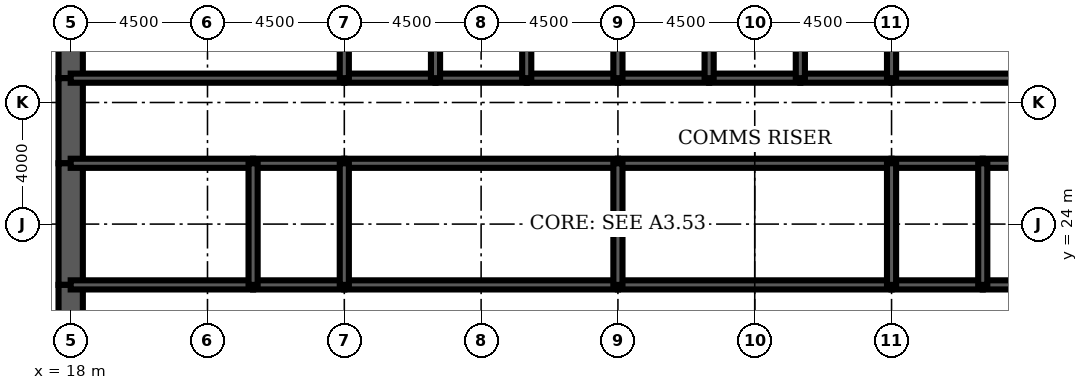
"""IFC4 building model, lengths in metres.
Left out: names, types, materials, properties, quantities, classifications, styles, units other than length and angle.
Written with IfcOpenShell. Run it as: python <this file> out.ifc"""

import sys

from ifc_helpers import new_model, si_unit, direction, frame, frame_2d, origin, place, context, subcontext, project, spatial, rectangle, extrude, element, fill, save


model = new_model("IFC4")
c1 = context("Model", 3, precision=1e-05, world=origin(), true_north=direction((0.0, 1.0)))
c2 = subcontext(c1, "Body", "Model", "MODEL_VIEW")
j1 = project(units=[si_unit("LENGTHUNIT", "METRE"), si_unit("PLANEANGLEUNIT", "RADIAN")], contexts=[c1])
p1 = place(None, origin())
s1 = spatial("IfcSite", under=j1, at=p1, CompositionType="ELEMENT")
p2 = place(p1, origin())
s2 = spatial("IfcBuilding", under=s1, at=p2, CompositionType="ELEMENT")
p3 = place(p2, frame((0.0, 0.0, 227.8)))
s3 = spatial("IfcBuildingStorey", under=s2, at=p3, CompositionType="ELEMENT", Elevation=227.8)
p4 = place(p3, frame((18.0, 32.0, 0.0), z_axis=(0.0, 0.0, 1.0), x_axis=(0.0, -1.0, 0.0)))
e1 = element("IfcWall", 1, at=p4, inside=s3, PredefinedType="SHEAR", context=c2, shape_type="SweptSolid", body=[
    extrude(rectangle(XDim=3.2, YDim=0.8, at=frame_2d((1.6, 0.0))), origin(), (0.0, 0.0, 1.0), 4.2),
])
p5 = place(p3, frame((18.0, 28.8, 0.0), z_axis=(0.0, 0.0, 1.0), x_axis=(0.0, -1.0, 0.0)))
e2 = element("IfcWall", 2, at=p5, inside=s3, PredefinedType="SHEAR", context=c2, shape_type="SweptSolid", body=[
    extrude(rectangle(XDim=2.8, YDim=0.8, at=frame_2d((1.4, 0.0))), origin(), (0.0, 0.0, 1.0), 4.2),
])
p6 = place(p5, frame((0.4, 0.0, 0.0)))
e3 = element("IfcOpeningElement", 3, at=p6, cuts=e2, PredefinedType="OPENING", context=c2, shape_type="SweptSolid", body=[
    extrude(rectangle(XDim=1.8, YDim=2.1, at=frame_2d((0.9, 1.05))), frame((0.0, 0.41, 0.0), z_axis=(0.0, -1.0, 0.0), x_axis=(1.0, 0.0, 0.0)), (0.0, 0.0, 1.0), 0.82),
])
p7 = place(p3, frame((18.0, 26.0, 0.0), z_axis=(0.0, 0.0, 1.0), x_axis=(0.0, -1.0, 0.0)))
e4 = element("IfcWall", 4, at=p7, inside=s3, PredefinedType="SHEAR", context=c2, shape_type="SweptSolid", body=[
    extrude(rectangle(XDim=4.0, YDim=0.8, at=frame_2d((2.0, 0.0))), origin(), (0.0, 0.0, 1.0), 4.2),
])
p8 = place(p3, frame((18.0, 22.0, 0.0), z_axis=(0.0, 0.0, 1.0), x_axis=(0.0, -1.0, 0.0)))
e5 = element("IfcWall", 5, at=p8, inside=s3, PredefinedType="SHEAR", context=c2, shape_type="SweptSolid", body=[
    extrude(rectangle(XDim=2.8, YDim=0.8, at=frame_2d((1.4, 0.0))), origin(), (0.0, 0.0, 1.0), 4.2),
])
p9 = place(p8, frame((0.6, 0.0, 0.0)))
e6 = element("IfcOpeningElement", 6, at=p9, cuts=e5, PredefinedType="OPENING", context=c2, shape_type="SweptSolid", body=[
    extrude(rectangle(XDim=1.8, YDim=2.1, at=frame_2d((0.9, 1.05))), frame((0.0, 0.41, 0.0), z_axis=(0.0, -1.0, 0.0), x_axis=(1.0, 0.0, 0.0)), (0.0, 0.0, 1.0), 0.82),
])
p10 = place(p3, frame((18.0, 28.8, 0.0), z_axis=(0.0, 0.0, 1.0), x_axis=(1.0, 0.0, 0.0)))
e7 = element("IfcWall", 7, at=p10, inside=s3, PredefinedType="SOLIDWALL", context=c2, shape_type="SweptSolid", body=[
    extrude(rectangle(XDim=9.0, YDim=0.3, at=frame_2d((4.5, 0.0))), origin(), (0.0, 0.0, 1.0), 4.2),
])
p11 = place(p10, frame((0.65, 0.0, 0.0)))
e8 = element("IfcOpeningElement", 8, at=p11, cuts=e7, PredefinedType="OPENING", context=c2, shape_type="SweptSolid", body=[
    extrude(rectangle(XDim=1.0, YDim=2.1, at=frame_2d((0.5, 1.05))), frame((0.0, 0.16, 0.0), z_axis=(0.0, -1.0, 0.0), x_axis=(1.0, 0.0, 0.0)), (0.0, 0.0, 1.0), 0.32),
])
p12 = place(p3, frame((27.0, 28.8, 0.0), z_axis=(0.0, 0.0, 1.0), x_axis=(1.0, 0.0, 0.0)))
e9 = element("IfcWall", 9, at=p12, inside=s3, PredefinedType="SOLIDWALL", context=c2, shape_type="SweptSolid", body=[
    extrude(rectangle(XDim=3.0, YDim=0.3, at=frame_2d((1.5, 0.0))), origin(), (0.0, 0.0, 1.0), 4.2),
])
p13 = place(p12, frame((0.95, 0.0, 0.0)))
e10 = element("IfcOpeningElement", 10, at=p13, cuts=e9, PredefinedType="OPENING", context=c2, shape_type="SweptSolid", body=[
    extrude(rectangle(XDim=1.1, YDim=2.2, at=frame_2d((0.55, 1.1))), frame((0.0, 0.16, 0.0), z_axis=(0.0, -1.0, 0.0), x_axis=(1.0, 0.0, 0.0)), (0.0, 0.0, 1.0), 0.32),
])
p14 = place(p3, frame((30.0, 28.8, 0.0), z_axis=(0.0, 0.0, 1.0), x_axis=(1.0, 0.0, 0.0)))
e11 = element("IfcWall", 11, at=p14, inside=s3, PredefinedType="SOLIDWALL", context=c2, shape_type="SweptSolid", body=[
    extrude(rectangle(XDim=3.0, YDim=0.3, at=frame_2d((1.5, 0.0))), origin(), (0.0, 0.0, 1.0), 4.2),
])
p15 = place(p14, frame((0.95, 0.0, 0.0)))
e12 = element("IfcOpeningElement", 12, at=p15, cuts=e11, PredefinedType="OPENING", context=c2, shape_type="SweptSolid", body=[
    extrude(rectangle(XDim=1.1, YDim=2.2, at=frame_2d((0.55, 1.1))), frame((0.0, 0.16, 0.0), z_axis=(0.0, -1.0, 0.0), x_axis=(1.0, 0.0, 0.0)), (0.0, 0.0, 1.0), 0.32),
])
p16 = place(p3, frame((33.0, 28.8, 0.0), z_axis=(0.0, 0.0, 1.0), x_axis=(1.0, 0.0, 0.0)))
e13 = element("IfcWall", 13, at=p16, inside=s3, PredefinedType="SOLIDWALL", context=c2, shape_type="SweptSolid", body=[
    extrude(rectangle(XDim=3.0, YDim=0.3, at=frame_2d((1.5, 0.0))), origin(), (0.0, 0.0, 1.0), 4.2),
])
p17 = place(p16, frame((0.95, 0.0, 0.0)))
e14 = element("IfcOpeningElement", 14, at=p17, cuts=e13, PredefinedType="OPENING", context=c2, shape_type="SweptSolid", body=[
    extrude(rectangle(XDim=1.1, YDim=2.2, at=frame_2d((0.55, 1.1))), frame((0.0, 0.16, 0.0), z_axis=(0.0, -1.0, 0.0), x_axis=(1.0, 0.0, 0.0)), (0.0, 0.0, 1.0), 0.32),
])
for number, where, z_axis, x_axis in (
    (15, (36.0, 28.8, 0.0), (0.0, 0.0, 1.0), (1.0, 0.0, 0.0)),
    (16, (39.0, 28.8, 0.0), (0.0, 0.0, 1.0), (1.0, 0.0, 0.0)),
):
    element("IfcWall", number, at=place(p3, frame(where, z_axis=z_axis, x_axis=x_axis)), inside=s3, PredefinedType="SOLIDWALL", context=c2, shape_type="SweptSolid", body=[
        extrude(rectangle(XDim=3.0, YDim=0.3, at=frame_2d((1.5, 0.0))), origin(), (0.0, 0.0, 1.0), 4.2),
    ])
p18 = place(p3, frame((42.0, 28.8, 0.0), z_axis=(0.0, 0.0, 1.0), x_axis=(1.0, 0.0, 0.0)))
e17 = element("IfcWall", 17, at=p18, inside=s3, PredefinedType="SOLIDWALL", context=c2, shape_type="SweptSolid", body=[
    extrude(rectangle(XDim=3.0, YDim=0.3, at=frame_2d((1.5, 0.0))), origin(), (0.0, 0.0, 1.0), 4.2),
])
p19 = place(p18, frame((0.95, 0.0, 0.0)))
e18 = element("IfcOpeningElement", 18, at=p19, cuts=e17, PredefinedType="OPENING", context=c2, shape_type="SweptSolid", body=[
    extrude(rectangle(XDim=1.1, YDim=2.2, at=frame_2d((0.55, 1.1))), frame((0.0, 0.16, 0.0), z_axis=(0.0, -1.0, 0.0), x_axis=(1.0, 0.0, 0.0)), (0.0, 0.0, 1.0), 0.32),
])
p20 = place(p3, frame((45.0, 28.8, 0.0), z_axis=(0.0, 0.0, 1.0), x_axis=(1.0, 0.0, 0.0)))
e19 = element("IfcWall", 19, at=p20, inside=s3, PredefinedType="SOLIDWALL", context=c2, shape_type="SweptSolid", body=[
    extrude(rectangle(XDim=9.0, YDim=0.3, at=frame_2d((4.5, 0.0))), origin(), (0.0, 0.0, 1.0), 4.2),
])
p21 = place(p20, frame((7.35, 0.0, 0.0)))
e20 = element("IfcOpeningElement", 20, at=p21, cuts=e19, PredefinedType="OPENING", context=c2, shape_type="SweptSolid", body=[
    extrude(rectangle(XDim=1.0, YDim=2.1, at=frame_2d((0.5, 1.05))), frame((0.0, 0.16, 0.0), z_axis=(0.0, -1.0, 0.0), x_axis=(1.0, 0.0, 0.0)), (0.0, 0.0, 1.0), 0.32),
])
p22 = place(p3, frame((18.0, 22.0, 0.0), z_axis=(0.0, 0.0, 1.0), x_axis=(1.0, 0.0, 0.0)))
e21 = element("IfcWall", 21, at=p22, inside=s3, PredefinedType="SOLIDWALL", context=c2, shape_type="SweptSolid", body=[
    extrude(rectangle(XDim=6.0, YDim=0.3, at=frame_2d((3.0, 0.0))), origin(), (0.0, 0.0, 1.0), 4.2),
])
p23 = place(p22, frame((4.4, 0.0, 0.0)))
e22 = element("IfcOpeningElement", 22, at=p23, cuts=e21, PredefinedType="OPENING", context=c2, shape_type="SweptSolid", body=[
    extrude(rectangle(XDim=1.0, YDim=2.1, at=frame_2d((0.5, 1.05))), frame((0.0, 0.16, 0.0), z_axis=(0.0, -1.0, 0.0), x_axis=(1.0, 0.0, 0.0)), (0.0, 0.0, 1.0), 0.32),
])
p24 = place(p22, frame((0.65, 0.0, 0.0)))
e23 = element("IfcOpeningElement", 23, at=p24, cuts=e21, PredefinedType="OPENING", context=c2, shape_type="SweptSolid", body=[
    extrude(rectangle(XDim=1.0, YDim=2.1, at=frame_2d((0.5, 1.05))), frame((0.0, 0.16, 0.0), z_axis=(0.0, -1.0, 0.0), x_axis=(1.0, 0.0, 0.0)), (0.0, 0.0, 1.0), 0.32),
])
p25 = place(p3, frame((24.0, 22.0, 0.0), z_axis=(0.0, 0.0, 1.0), x_axis=(1.0, 0.0, 0.0)))
e24 = element("IfcWall", 24, at=p25, inside=s3, PredefinedType="SOLIDWALL", context=c2, shape_type="SweptSolid", body=[
    extrude(rectangle(XDim=3.0, YDim=0.3, at=frame_2d((1.5, 0.0))), origin(), (0.0, 0.0, 1.0), 4.2),
])
p26 = place(p25, frame((1.0, 0.0, 0.0)))
e25 = element("IfcOpeningElement", 25, at=p26, cuts=e24, PredefinedType="OPENING", context=c2, shape_type="SweptSolid", body=[
    extrude(rectangle(XDim=1.0, YDim=2.1, at=frame_2d((0.5, 1.05))), frame((0.0, 0.16, 0.0), z_axis=(0.0, -1.0, 0.0), x_axis=(1.0, 0.0, 0.0)), (0.0, 0.0, 1.0), 0.32),
])
p27 = place(p3, frame((27.0, 22.0, 0.0), z_axis=(0.0, 0.0, 1.0), x_axis=(1.0, 0.0, 0.0)))
e26 = element("IfcWall", 26, at=p27, inside=s3, PredefinedType="SOLIDWALL", context=c2, shape_type="SweptSolid", body=[
    extrude(rectangle(XDim=9.0, YDim=0.3, at=frame_2d((4.5, 0.0))), origin(), (0.0, 0.0, 1.0), 4.2),
])
p28 = place(p27, frame((4.0, 0.0, 0.0)))
e27 = element("IfcOpeningElement", 27, at=p28, cuts=e26, PredefinedType="OPENING", context=c2, shape_type="SweptSolid", body=[
    extrude(rectangle(XDim=1.0, YDim=2.1, at=frame_2d((0.5, 1.05))), frame((0.0, 0.16, 0.0), z_axis=(0.0, -1.0, 0.0), x_axis=(1.0, 0.0, 0.0)), (0.0, 0.0, 1.0), 0.32),
])
p29 = place(p3, frame((36.0, 22.0, 0.0), z_axis=(0.0, 0.0, 1.0), x_axis=(1.0, 0.0, 0.0)))
e28 = element("IfcWall", 28, at=p29, inside=s3, PredefinedType="SOLIDWALL", context=c2, shape_type="SweptSolid", body=[
    extrude(rectangle(XDim=9.0, YDim=0.3, at=frame_2d((4.5, 0.0))), origin(), (0.0, 0.0, 1.0), 4.2),
])
p30 = place(p29, frame((4.0, 0.0, 0.0)))
e29 = element("IfcOpeningElement", 29, at=p30, cuts=e28, PredefinedType="OPENING", context=c2, shape_type="SweptSolid", body=[
    extrude(rectangle(XDim=1.0, YDim=2.1, at=frame_2d((0.5, 1.05))), frame((0.0, 0.16, 0.0), z_axis=(0.0, -1.0, 0.0), x_axis=(1.0, 0.0, 0.0)), (0.0, 0.0, 1.0), 0.32),
])
p31 = place(p3, frame((45.0, 22.0, 0.0), z_axis=(0.0, 0.0, 1.0), x_axis=(1.0, 0.0, 0.0)))
e30 = element("IfcWall", 30, at=p31, inside=s3, PredefinedType="SOLIDWALL", context=c2, shape_type="SweptSolid", body=[
    extrude(rectangle(XDim=3.0, YDim=0.3, at=frame_2d((1.5, 0.0))), origin(), (0.0, 0.0, 1.0), 4.2),
])
p32 = place(p31, frame((1.0, 0.0, 0.0)))
e31 = element("IfcOpeningElement", 31, at=p32, cuts=e30, PredefinedType="OPENING", context=c2, shape_type="SweptSolid", body=[
    extrude(rectangle(XDim=1.0, YDim=2.1, at=frame_2d((0.5, 1.05))), frame((0.0, 0.16, 0.0), z_axis=(0.0, -1.0, 0.0), x_axis=(1.0, 0.0, 0.0)), (0.0, 0.0, 1.0), 0.32),
])
p33 = place(p3, frame((48.0, 22.0, 0.0), z_axis=(0.0, 0.0, 1.0), x_axis=(1.0, 0.0, 0.0)))
e32 = element("IfcWall", 32, at=p33, inside=s3, PredefinedType="SOLIDWALL", context=c2, shape_type="SweptSolid", body=[
    extrude(rectangle(XDim=6.0, YDim=0.3, at=frame_2d((3.0, 0.0))), origin(), (0.0, 0.0, 1.0), 4.2),
])
p34 = place(p33, frame((2.0, 0.0, 0.0)))
e33 = element("IfcOpeningElement", 33, at=p34, cuts=e32, PredefinedType="OPENING", context=c2, shape_type="SweptSolid", body=[
    extrude(rectangle(XDim=1.0, YDim=2.1, at=frame_2d((0.5, 1.05))), frame((0.0, 0.16, 0.0), z_axis=(0.0, -1.0, 0.0), x_axis=(1.0, 0.0, 0.0)), (0.0, 0.0, 1.0), 0.32),
])
p35 = place(p33, frame((4.35, 0.0, 0.0)))
e34 = element("IfcOpeningElement", 34, at=p35, cuts=e32, PredefinedType="OPENING", context=c2, shape_type="SweptSolid", body=[
    extrude(rectangle(XDim=1.0, YDim=2.1, at=frame_2d((0.5, 1.05))), frame((0.0, 0.16, 0.0), z_axis=(0.0, -1.0, 0.0), x_axis=(1.0, 0.0, 0.0)), (0.0, 0.0, 1.0), 0.32),
])
p36 = place(p3, frame((18.0, 26.0, 0.0), z_axis=(0.0, 0.0, 1.0), x_axis=(1.0, 0.0, 0.0)))
e35 = element("IfcWall", 35, at=p36, inside=s3, PredefinedType="SOLIDWALL", context=c2, shape_type="SweptSolid", body=[
    extrude(rectangle(XDim=6.0, YDim=0.3, at=frame_2d((3.0, 0.0))), origin(), (0.0, 0.0, 1.0), 4.2),
])
p37 = place(p3, frame((24.0, 26.0, 0.0), z_axis=(0.0, 0.0, 1.0), x_axis=(1.0, 0.0, 0.0)))
e36 = element("IfcWall", 36, at=p37, inside=s3, PredefinedType="SOLIDWALL", context=c2, shape_type="SweptSolid", body=[
    extrude(rectangle(XDim=3.0, YDim=0.3, at=frame_2d((1.5, 0.0))), origin(), (0.0, 0.0, 1.0), 4.2),
])
for number, where, z_axis, x_axis in (
    (37, (27.0, 26.0, 0.0), (0.0, 0.0, 1.0), (1.0, 0.0, 0.0)),
    (38, (36.0, 26.0, 0.0), (0.0, 0.0, 1.0), (1.0, 0.0, 0.0)),
):
    element("IfcWall", number, at=place(p3, frame(where, z_axis=z_axis, x_axis=x_axis)), inside=s3, PredefinedType="SOLIDWALL", context=c2, shape_type="SweptSolid", body=[
        extrude(rectangle(XDim=9.0, YDim=0.3, at=frame_2d((4.5, 0.0))), origin(), (0.0, 0.0, 1.0), 4.2),
    ])
p38 = place(p3, frame((45.0, 26.0, 0.0), z_axis=(0.0, 0.0, 1.0), x_axis=(1.0, 0.0, 0.0)))
e39 = element("IfcWall", 39, at=p38, inside=s3, PredefinedType="SOLIDWALL", context=c2, shape_type="SweptSolid", body=[
    extrude(rectangle(XDim=3.0, YDim=0.3, at=frame_2d((1.5, 0.0))), origin(), (0.0, 0.0, 1.0), 4.2),
])
p39 = place(p3, frame((48.0, 26.0, 0.0), z_axis=(0.0, 0.0, 1.0), x_axis=(1.0, 0.0, 0.0)))
e40 = element("IfcWall", 40, at=p39, inside=s3, PredefinedType="SOLIDWALL", context=c2, shape_type="SweptSolid", body=[
    extrude(rectangle(XDim=6.0, YDim=0.3, at=frame_2d((3.0, 0.0))), origin(), (0.0, 0.0, 1.0), 4.2),
])
for number, where, z_axis, x_axis in (
    (41, (27.0, 28.8, 0.0), (0.0, 0.0, 1.0), (0.0, 1.0, 0.0)),
    (42, (30.0, 28.8, 0.0), (0.0, 0.0, 1.0), (0.0, 1.0, 0.0)),
    (43, (33.0, 28.8, 0.0), (0.0, 0.0, 1.0), (0.0, 1.0, 0.0)),
    (44, (36.0, 28.8, 0.0), (0.0, 0.0, 1.0), (0.0, 1.0, 0.0)),
    (45, (39.0, 28.8, 0.0), (0.0, 0.0, 1.0), (0.0, 1.0, 0.0)),
    (46, (42.0, 28.8, 0.0), (0.0, 0.0, 1.0), (0.0, 1.0, 0.0)),
    (47, (45.0, 28.8, 0.0), (0.0, 0.0, 1.0), (0.0, 1.0, 0.0)),
):
    element("IfcWall", number, at=place(p3, frame(where, z_axis=z_axis, x_axis=x_axis)), inside=s3, PredefinedType="SOLIDWALL", context=c2, shape_type="SweptSolid", body=[
        extrude(rectangle(XDim=3.2, YDim=0.3, at=frame_2d((1.6, 0.0))), origin(), (0.0, 0.0, 1.0), 4.2),
    ])
for number, where, z_axis, x_axis in (
    (48, (24.0, 22.0, 0.0), (0.0, 0.0, 1.0), (0.0, 1.0, 0.0)),
    (49, (27.0, 22.0, 0.0), (0.0, 0.0, 1.0), (0.0, 1.0, 0.0)),
    (50, (36.0, 22.0, 0.0), (0.0, 0.0, 1.0), (0.0, 1.0, 0.0)),
    (51, (45.0, 22.0, 0.0), (0.0, 0.0, 1.0), (0.0, 1.0, 0.0)),
    (52, (48.0, 22.0, 0.0), (0.0, 0.0, 1.0), (0.0, 1.0, 0.0)),
):
    element("IfcWall", number, at=place(p3, frame(where, z_axis=z_axis, x_axis=x_axis)), inside=s3, PredefinedType="SOLIDWALL", context=c2, shape_type="SweptSolid", body=[
        extrude(rectangle(XDim=4.0, YDim=0.3, at=frame_2d((2.0, 0.0))), origin(), (0.0, 0.0, 1.0), 4.2),
    ])
p40 = place(p3, frame((42.5, 22.15, 0.0), z_axis=(0.0, 0.0, 1.0), x_axis=(0.0, 1.0, 0.0)))
e53 = element("IfcWall", 53, at=p40, inside=s3, PredefinedType="PARTITIONING", context=c2, shape_type="SweptSolid", body=[
    extrude(rectangle(XDim=3.7, YDim=0.15, at=frame_2d((1.85, 0.0))), origin(), (0.0, 0.0, 1.0), 3.0),
])
p41 = place(p40, frame((2.2, 0.0, 0.0)))
e54 = element("IfcOpeningElement", 54, at=p41, cuts=e53, PredefinedType="OPENING", context=c2, shape_type="SweptSolid", body=[
    extrude(rectangle(XDim=1.0, YDim=2.1, at=frame_2d((0.5, 1.05))), frame((0.0, 0.085, 0.0), z_axis=(0.0, -1.0, 0.0), x_axis=(1.0, 0.0, 0.0)), (0.0, 0.0, 1.0), 0.17),
])
p42 = place(p3, frame((19.975, 22.15, 0.0), z_axis=(0.0, 0.0, 1.0), x_axis=(0.0, 1.0, 0.0)))
e55 = element("IfcWall", 55, at=p42, inside=s3, PredefinedType="PARTITIONING", context=c2, shape_type="SweptSolid", body=[
    extrude(rectangle(XDim=3.7, YDim=0.15, at=frame_2d((1.85, 0.0))), origin(), (0.0, 0.0, 1.0), 3.0),
])
p43 = place(p3, frame((23.7, 26.15, 0.0), z_axis=(0.0, 0.0, 1.0), x_axis=(0.0, 1.0, 0.0)))
e56 = element("IfcWall", 56, at=p43, inside=s3, PredefinedType="PARTITIONING", context=c2, shape_type="SweptSolid", body=[
    extrude(rectangle(XDim=2.5, YDim=0.15, at=frame_2d((1.25, 0.0))), origin(), (0.0, 0.0, 1.0), 3.0),
])
p44 = place(p43, frame((0.35, 0.0, 0.0)))
e57 = element("IfcOpeningElement", 57, at=p44, cuts=e56, PredefinedType="OPENING", context=c2, shape_type="SweptSolid", body=[
    extrude(rectangle(XDim=1.0, YDim=2.1, at=frame_2d((0.5, 1.05))), frame((0.0, 0.085, 0.0), z_axis=(0.0, -1.0, 0.0), x_axis=(1.0, 0.0, 0.0)), (0.0, 0.0, 1.0), 0.17),
])
p45 = place(p41, origin())
e58 = element("IfcDoor", 58, at=p45, inside=s3, OperationType="SINGLE_SWING_RIGHT", PredefinedType="DOOR", context=c2, shape_type="SweptSolid", body=[
    extrude(rectangle(XDim=1.0, YDim=2.1, at=frame_2d((0.5, 1.05))), frame((0.0, 0.025, 0.0), z_axis=(0.0, -1.0, 0.0), x_axis=(1.0, 0.0, 0.0)), (0.0, 0.0, 1.0), 0.05),
])
fill(e54, e58)
p46 = place(p44, origin())
e59 = element("IfcDoor", 59, at=p46, inside=s3, OperationType="SINGLE_SWING_LEFT", PredefinedType="DOOR", context=c2, shape_type="SweptSolid", body=[
    extrude(rectangle(XDim=1.0, YDim=2.1, at=frame_2d((0.5, 1.05))), frame((0.0, 0.025, 0.0), z_axis=(0.0, -1.0, 0.0), x_axis=(1.0, 0.0, 0.0)), (0.0, 0.0, 1.0), 0.05),
])
fill(e57, e59)
p47 = place(p19, origin())
e60 = element("IfcDoor", 60, at=p47, inside=s3, OperationType="DOUBLE_DOOR_SLIDING", PredefinedType="USERDEFINED", context=c2, shape_type="SweptSolid", body=[
    extrude(rectangle(XDim=1.1, YDim=2.2, at=frame_2d((0.55, 1.1))), frame((0.0, 0.025, 0.0), z_axis=(0.0, -1.0, 0.0), x_axis=(1.0, 0.0, 0.0)), (0.0, 0.0, 1.0), 0.05),
])
fill(e18, e60)
p48 = place(p13, origin())
e61 = element("IfcDoor", 61, at=p48, inside=s3, OperationType="DOUBLE_DOOR_SLIDING", PredefinedType="USERDEFINED", context=c2, shape_type="SweptSolid", body=[
    extrude(rectangle(XDim=1.1, YDim=2.2, at=frame_2d((0.55, 1.1))), frame((0.0, 0.025, 0.0), z_axis=(0.0, -1.0, 0.0), x_axis=(1.0, 0.0, 0.0)), (0.0, 0.0, 1.0), 0.05),
])
fill(e10, e61)
p49 = place(p15, origin())
e62 = element("IfcDoor", 62, at=p49, inside=s3, OperationType="DOUBLE_DOOR_SLIDING", PredefinedType="USERDEFINED", context=c2, shape_type="SweptSolid", body=[
    extrude(rectangle(XDim=1.1, YDim=2.2, at=frame_2d((0.55, 1.1))), frame((0.0, 0.025, 0.0), z_axis=(0.0, -1.0, 0.0), x_axis=(1.0, 0.0, 0.0)), (0.0, 0.0, 1.0), 0.05),
])
fill(e12, e62)
p50 = place(p17, origin())
e63 = element("IfcDoor", 63, at=p50, inside=s3, OperationType="DOUBLE_DOOR_SLIDING", PredefinedType="USERDEFINED", context=c2, shape_type="SweptSolid", body=[
    extrude(rectangle(XDim=1.1, YDim=2.2, at=frame_2d((0.55, 1.1))), frame((0.0, 0.025, 0.0), z_axis=(0.0, -1.0, 0.0), x_axis=(1.0, 0.0, 0.0)), (0.0, 0.0, 1.0), 0.05),
])
fill(e14, e63)
p51 = place(p11, origin())
e64 = element("IfcDoor", 64, at=p51, inside=s3, OperationType="SINGLE_SWING_LEFT", PredefinedType="DOOR", context=c2, shape_type="SweptSolid", body=[
    extrude(rectangle(XDim=1.0, YDim=2.1, at=frame_2d((0.5, 1.05))), frame((0.0, 0.025, 0.0), z_axis=(0.0, -1.0, 0.0), x_axis=(1.0, 0.0, 0.0)), (0.0, 0.0, 1.0), 0.05),
])
fill(e8, e64)
p52 = place(p9, origin())
e65 = element("IfcDoor", 65, at=p52, inside=s3, OperationType="SINGLE_SWING_LEFT", PredefinedType="DOOR", context=c2, shape_type="SweptSolid", body=[
    extrude(rectangle(XDim=1.8, YDim=2.1, at=frame_2d((0.9, 1.05))), frame((0.0, 0.4, 0.0), z_axis=(0.0, -1.0, 0.0), x_axis=(1.0, 0.0, 0.0)), (0.0, 0.0, 1.0), 0.8),
])
fill(e6, e65)
p53 = place(p6, origin())
e66 = element("IfcDoor", 66, at=p53, inside=s3, OperationType="SINGLE_SWING_LEFT", PredefinedType="DOOR", context=c2, shape_type="SweptSolid", body=[
    extrude(rectangle(XDim=1.8, YDim=2.1, at=frame_2d((0.9, 1.05))), frame((0.0, 0.4, 0.0), z_axis=(0.0, -1.0, 0.0), x_axis=(1.0, 0.0, 0.0)), (0.0, 0.0, 1.0), 0.8),
])
fill(e3, e66)
p54 = place(p23, origin())
e67 = element("IfcDoor", 67, at=p54, inside=s3, OperationType="SINGLE_SWING_RIGHT", PredefinedType="DOOR", context=c2, shape_type="SweptSolid", body=[
    extrude(rectangle(XDim=1.0, YDim=2.1, at=frame_2d((0.5, 1.05))), frame((0.0, 0.025, 0.0), z_axis=(0.0, -1.0, 0.0), x_axis=(1.0, 0.0, 0.0)), (0.0, 0.0, 1.0), 0.05),
])
fill(e22, e67)
p55 = place(p26, origin())
e68 = element("IfcDoor", 68, at=p55, inside=s3, OperationType="SINGLE_SWING_LEFT", PredefinedType="DOOR", context=c2, shape_type="SweptSolid", body=[
    extrude(rectangle(XDim=1.0, YDim=2.1, at=frame_2d((0.5, 1.05))), frame((0.0, 0.025, 0.0), z_axis=(0.0, -1.0, 0.0), x_axis=(1.0, 0.0, 0.0)), (0.0, 0.0, 1.0), 0.05),
])
fill(e25, e68)
p56 = place(p28, origin())
e69 = element("IfcDoor", 69, at=p56, inside=s3, OperationType="SINGLE_SWING_LEFT", PredefinedType="DOOR", context=c2, shape_type="SweptSolid", body=[
    extrude(rectangle(XDim=1.0, YDim=2.1, at=frame_2d((0.5, 1.05))), frame((0.0, 0.025, 0.0), z_axis=(0.0, -1.0, 0.0), x_axis=(1.0, 0.0, 0.0)), (0.0, 0.0, 1.0), 0.05),
])
fill(e27, e69)
p57 = place(p30, origin())
e70 = element("IfcDoor", 70, at=p57, inside=s3, OperationType="SINGLE_SWING_LEFT", PredefinedType="DOOR", context=c2, shape_type="SweptSolid", body=[
    extrude(rectangle(XDim=1.0, YDim=2.1, at=frame_2d((0.5, 1.05))), frame((0.0, 0.025, 0.0), z_axis=(0.0, -1.0, 0.0), x_axis=(1.0, 0.0, 0.0)), (0.0, 0.0, 1.0), 0.05),
])
fill(e29, e70)
p58 = place(p32, origin())
e71 = element("IfcDoor", 71, at=p58, inside=s3, OperationType="SINGLE_SWING_LEFT", PredefinedType="DOOR", context=c2, shape_type="SweptSolid", body=[
    extrude(rectangle(XDim=1.0, YDim=2.1, at=frame_2d((0.5, 1.05))), frame((0.0, 0.025, 0.0), z_axis=(0.0, -1.0, 0.0), x_axis=(1.0, 0.0, 0.0)), (0.0, 0.0, 1.0), 0.05),
])
fill(e31, e71)
p59 = place(p24, origin())
e72 = element("IfcDoor", 72, at=p59, inside=s3, OperationType="SINGLE_SWING_LEFT", PredefinedType="DOOR", context=c2, shape_type="SweptSolid", body=[
    extrude(rectangle(XDim=1.0, YDim=2.1, at=frame_2d((0.5, 1.05))), frame((0.0, 0.025, 0.0), z_axis=(0.0, -1.0, 0.0), x_axis=(1.0, 0.0, 0.0)), (0.0, 0.0, 1.0), 0.05),
])
fill(e23, e72)
save(model, sys.argv[1])
